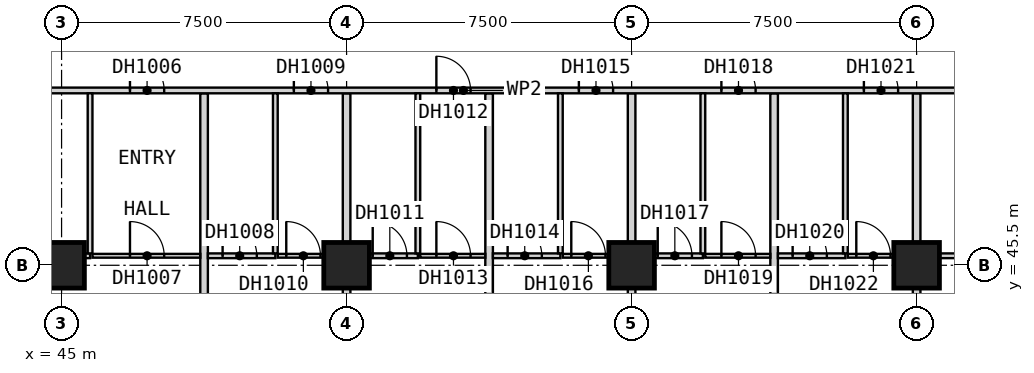
"""IFC4 building model, lengths in metres.
Left out: names, types, materials, properties, quantities, classifications, styles, units other than length and angle.
Written with IfcOpenShell. Run it as: python <this file> out.ifc"""

import sys

from ifc_helpers import new_model, si_unit, direction, frame, frame_2d, origin, origin_2d, place, context, subcontext, project, spatial, rectangle, extrude, element, fill, save


model = new_model("IFC4")
c1 = context("Model", 3, precision=1e-05, world=origin(), true_north=direction((0.0, 1.0)))
c2 = subcontext(c1, "Body", "Model", "MODEL_VIEW")
j1 = project(units=[si_unit("LENGTHUNIT", "METRE"), si_unit("PLANEANGLEUNIT", "RADIAN")], contexts=[c1])
p1 = place(None, origin())
s1 = spatial("IfcSite", under=j1, at=p1, CompositionType="ELEMENT")
p2 = place(p1, origin())
s2 = spatial("IfcBuilding", under=s1, at=p2, CompositionType="ELEMENT")
p3 = place(p2, frame((0.0, 0.0, 34.0)))
s3 = spatial("IfcBuildingStorey", under=s2, at=p3, CompositionType="ELEMENT", Elevation=34.0)
for number, where, z_axis, x_axis in (
    (1, (45.0, 45.5, 0.0), (0.0, 0.0, 1.0), (1.0, 0.0, 0.0)),
    (2, (52.5, 45.5, 0.0), (0.0, 0.0, 1.0), (1.0, 0.0, 0.0)),
    (3, (60.0, 45.5, 0.0), (0.0, 0.0, 1.0), (1.0, 0.0, 0.0)),
    (4, (67.5, 45.5, 0.0), (0.0, 0.0, 1.0), (1.0, 0.0, 0.0)),
):
    element("IfcColumn", number, at=place(p3, frame(where, z_axis=z_axis, x_axis=x_axis)), inside=s3, PredefinedType="COLUMN", context=c2, shape_type="SweptSolid", body=[
        extrude(rectangle(XDim=1.2, YDim=1.2, at=origin_2d()), origin(), (0.0, 0.0, 1.0), 3.6),
    ])
p4 = place(p3, frame((48.75, 38.31, 0.0), z_axis=(0.0, 0.0, 1.0), x_axis=(0.0, 1.0, 0.0)))
e5 = element("IfcWall", 5, at=p4, inside=s3, PredefinedType="PARTITIONING", context=c2, shape_type="SweptSolid", body=[
    extrude(rectangle(XDim=11.715, YDim=0.2, at=frame_2d((5.857, 0.0))), origin(), (0.0, 0.0, 1.0), 3.35),
])
p5 = place(p3, frame((52.5, 37.5, 0.0), z_axis=(0.0, 0.0, 1.0), x_axis=(0.0, 1.0, 0.0)))
e6 = element("IfcWall", 6, at=p5, inside=s3, PredefinedType="PARTITIONING", context=c2, shape_type="SweptSolid", body=[
    extrude(rectangle(XDim=12.525, YDim=0.2, at=frame_2d((6.262, 0.0))), origin(), (0.0, 0.0, 1.0), 3.35),
])
p6 = place(p3, frame((56.25, 38.31, 0.0), z_axis=(0.0, 0.0, 1.0), x_axis=(0.0, 1.0, 0.0)))
e7 = element("IfcWall", 7, at=p6, inside=s3, PredefinedType="PARTITIONING", context=c2, shape_type="SweptSolid", body=[
    extrude(rectangle(XDim=11.715, YDim=0.2, at=frame_2d((5.857, 0.0))), origin(), (0.0, 0.0, 1.0), 3.35),
])
p7 = place(p3, frame((60.0, 37.5, 0.0), z_axis=(0.0, 0.0, 1.0), x_axis=(0.0, 1.0, 0.0)))
e8 = element("IfcWall", 8, at=p7, inside=s3, PredefinedType="PARTITIONING", context=c2, shape_type="SweptSolid", body=[
    extrude(rectangle(XDim=12.525, YDim=0.2, at=frame_2d((6.262, 0.0))), origin(), (0.0, 0.0, 1.0), 3.35),
])
p8 = place(p3, frame((63.75, 38.31, 0.0), z_axis=(0.0, 0.0, 1.0), x_axis=(0.0, 1.0, 0.0)))
e9 = element("IfcWall", 9, at=p8, inside=s3, PredefinedType="PARTITIONING", context=c2, shape_type="SweptSolid", body=[
    extrude(rectangle(XDim=11.715, YDim=0.2, at=frame_2d((5.857, 0.0))), origin(), (0.0, 0.0, 1.0), 3.35),
])
p9 = place(p3, frame((67.5, 37.5, 0.0), z_axis=(0.0, 0.0, 1.0), x_axis=(0.0, 1.0, 0.0)))
e10 = element("IfcWall", 10, at=p9, inside=s3, PredefinedType="PARTITIONING", context=c2, shape_type="SweptSolid", body=[
    extrude(rectangle(XDim=12.525, YDim=0.2, at=frame_2d((6.262, 0.0))), origin(), (0.0, 0.0, 1.0), 3.35),
])
p10 = place(p3, frame((33.75, 50.1, 0.0), z_axis=(0.0, 0.0, 1.0), x_axis=(1.0, 0.0, 0.0)))
e11 = element("IfcWall", 11, at=p10, inside=s3, PredefinedType="PARTITIONING", context=c2, shape_type="SweptSolid", body=[
    extrude(rectangle(XDim=43.65, YDim=0.15, at=frame_2d((21.825, 0.0))), origin(), (0.0, 0.0, 1.0), 3.35),
])
p11 = place(p10, frame((5.175, 0.0, 0.0)))
e12 = element("IfcOpeningElement", 12, at=p11, cuts=e11, PredefinedType="OPENING", context=c2, shape_type="SweptSolid", body=[
    extrude(rectangle(XDim=0.9, YDim=2.1, at=frame_2d((0.45, 1.05))), frame((0.0, 0.085, 0.0), z_axis=(0.0, -1.0, 0.0), x_axis=(1.0, 0.0, 0.0)), (0.0, 0.0, 1.0), 0.17),
])
p12 = place(p10, frame((13.05, 0.0, 0.0)))
e13 = element("IfcOpeningElement", 13, at=p12, cuts=e11, PredefinedType="OPENING", context=c2, shape_type="SweptSolid", body=[
    extrude(rectangle(XDim=0.9, YDim=2.1, at=frame_2d((0.45, 1.05))), frame((0.0, 0.085, 0.0), z_axis=(0.0, -1.0, 0.0), x_axis=(1.0, 0.0, 0.0)), (0.0, 0.0, 1.0), 0.17),
])
p13 = place(p10, frame((17.363, 0.0, 0.0)))
e14 = element("IfcOpeningElement", 14, at=p13, cuts=e11, PredefinedType="OPENING", context=c2, shape_type="SweptSolid", body=[
    extrude(rectangle(XDim=0.9, YDim=2.1, at=frame_2d((0.45, 1.05))), frame((0.0, 0.085, 0.0), z_axis=(0.0, -1.0, 0.0), x_axis=(1.0, 0.0, 0.0)), (0.0, 0.0, 1.0), 0.17),
])
p14 = place(p10, frame((21.113, 0.0, 0.0)))
e15 = element("IfcOpeningElement", 15, at=p14, cuts=e11, PredefinedType="OPENING", context=c2, shape_type="SweptSolid", body=[
    extrude(rectangle(XDim=0.9, YDim=2.1, at=frame_2d((0.45, 1.05))), frame((0.0, 0.085, 0.0), z_axis=(0.0, -1.0, 0.0), x_axis=(1.0, 0.0, 0.0)), (0.0, 0.0, 1.0), 0.17),
])
p15 = place(p10, frame((24.863, 0.0, 0.0)))
e16 = element("IfcOpeningElement", 16, at=p15, cuts=e11, PredefinedType="OPENING", context=c2, shape_type="SweptSolid", body=[
    extrude(rectangle(XDim=0.9, YDim=2.1, at=frame_2d((0.45, 1.05))), frame((0.0, 0.085, 0.0), z_axis=(0.0, -1.0, 0.0), x_axis=(1.0, 0.0, 0.0)), (0.0, 0.0, 1.0), 0.17),
])
p16 = place(p10, frame((28.613, 0.0, 0.0)))
e17 = element("IfcOpeningElement", 17, at=p16, cuts=e11, PredefinedType="OPENING", context=c2, shape_type="SweptSolid", body=[
    extrude(rectangle(XDim=0.9, YDim=2.1, at=frame_2d((0.45, 1.05))), frame((0.0, 0.085, 0.0), z_axis=(0.0, -1.0, 0.0), x_axis=(1.0, 0.0, 0.0)), (0.0, 0.0, 1.0), 0.17),
])
p17 = place(p10, frame((32.363, 0.0, 0.0)))
e18 = element("IfcOpeningElement", 18, at=p17, cuts=e11, PredefinedType="OPENING", context=c2, shape_type="SweptSolid", body=[
    extrude(rectangle(XDim=0.9, YDim=2.1, at=frame_2d((0.45, 1.05))), frame((0.0, 0.085, 0.0), z_axis=(0.0, -1.0, 0.0), x_axis=(1.0, 0.0, 0.0)), (0.0, 0.0, 1.0), 0.17),
])
p18 = place(p10, frame((39.3, 0.0, 0.0)))
e19 = element("IfcOpeningElement", 19, at=p18, cuts=e11, PredefinedType="OPENING", context=c2, shape_type="SweptSolid", body=[
    extrude(rectangle(XDim=0.9, YDim=2.1, at=frame_2d((0.45, 1.05))), frame((0.0, 0.085, 0.0), z_axis=(0.0, -1.0, 0.0), x_axis=(1.0, 0.0, 0.0)), (0.0, 0.0, 1.0), 0.17),
])
p19 = place(p10, frame((42.0, 0.0, 0.0)))
e20 = element("IfcOpeningElement", 20, at=p19, cuts=e11, PredefinedType="OPENING", context=c2, shape_type="SweptSolid", body=[
    extrude(rectangle(XDim=0.9, YDim=2.1, at=frame_2d((0.45, 1.05))), frame((0.0, 0.085, 0.0), z_axis=(0.0, -1.0, 0.0), x_axis=(1.0, 0.0, 0.0)), (0.0, 0.0, 1.0), 0.17),
])
p20 = place(p3, frame((45.812, 45.75, 0.0), z_axis=(0.0, 0.0, 1.0), x_axis=(1.0, 0.0, 0.0)))
e21 = element("IfcWall", 21, at=p20, inside=s3, PredefinedType="PARTITIONING", context=c2, shape_type="SweptSolid", body=[
    extrude(rectangle(XDim=2.837, YDim=0.1, at=frame_2d((1.419, 0.0))), origin(), (0.0, 0.0, 1.0), 3.35),
])
p21 = place(p20, frame((0.988, 0.0, 0.0)))
e22 = element("IfcOpeningElement", 22, at=p21, cuts=e21, PredefinedType="OPENING", context=c2, shape_type="SweptSolid", body=[
    extrude(rectangle(XDim=0.9, YDim=2.1, at=frame_2d((0.45, 1.05))), frame((0.0, 0.06, 0.0), z_axis=(0.0, -1.0, 0.0), x_axis=(1.0, 0.0, 0.0)), (0.0, 0.0, 1.0), 0.12),
])
p22 = place(p3, frame((50.688, 45.75, 0.0), z_axis=(0.0, 0.0, 1.0), x_axis=(1.0, 0.0, 0.0)))
e23 = element("IfcWall", 23, at=p22, inside=s3, PredefinedType="PARTITIONING", context=c2, shape_type="SweptSolid", body=[
    extrude(rectangle(XDim=1.712, YDim=0.1, at=frame_2d((0.856, 0.0))), origin(), (0.0, 0.0, 1.0), 3.35),
])
p23 = place(p22, frame((0.225, 0.0, 0.0)))
e24 = element("IfcOpeningElement", 24, at=p23, cuts=e23, PredefinedType="OPENING", context=c2, shape_type="SweptSolid", body=[
    extrude(rectangle(XDim=0.9, YDim=2.1, at=frame_2d((0.45, 1.05))), frame((0.0, 0.06, 0.0), z_axis=(0.0, -1.0, 0.0), x_axis=(1.0, 0.0, 0.0)), (0.0, 0.0, 1.0), 0.12),
])
p24 = place(p3, frame((54.438, 45.75, 0.0), z_axis=(0.0, 0.0, 1.0), x_axis=(1.0, 0.0, 0.0)))
e25 = element("IfcWall", 25, at=p24, inside=s3, PredefinedType="PARTITIONING", context=c2, shape_type="SweptSolid", body=[
    extrude(rectangle(XDim=1.712, YDim=0.1, at=frame_2d((0.856, 0.0))), origin(), (0.0, 0.0, 1.0), 3.35),
])
p25 = place(p24, frame((0.425, 0.0, 0.0)))
e26 = element("IfcOpeningElement", 26, at=p25, cuts=e25, PredefinedType="OPENING", context=c2, shape_type="SweptSolid", body=[
    extrude(rectangle(XDim=0.9, YDim=2.1, at=frame_2d((0.45, 1.05))), frame((0.0, 0.06, 0.0), z_axis=(0.0, -1.0, 0.0), x_axis=(1.0, 0.0, 0.0)), (0.0, 0.0, 1.0), 0.12),
])
p26 = place(p3, frame((58.188, 45.75, 0.0), z_axis=(0.0, 0.0, 1.0), x_axis=(1.0, 0.0, 0.0)))
e27 = element("IfcWall", 27, at=p26, inside=s3, PredefinedType="PARTITIONING", context=c2, shape_type="SweptSolid", body=[
    extrude(rectangle(XDim=1.712, YDim=0.1, at=frame_2d((0.856, 0.0))), origin(), (0.0, 0.0, 1.0), 3.35),
])
p27 = place(p26, frame((0.225, 0.0, 0.0)))
e28 = element("IfcOpeningElement", 28, at=p27, cuts=e27, PredefinedType="OPENING", context=c2, shape_type="SweptSolid", body=[
    extrude(rectangle(XDim=0.9, YDim=2.1, at=frame_2d((0.45, 1.05))), frame((0.0, 0.06, 0.0), z_axis=(0.0, -1.0, 0.0), x_axis=(1.0, 0.0, 0.0)), (0.0, 0.0, 1.0), 0.12),
])
p28 = place(p3, frame((61.938, 45.75, 0.0), z_axis=(0.0, 0.0, 1.0), x_axis=(1.0, 0.0, 0.0)))
e29 = element("IfcWall", 29, at=p28, inside=s3, PredefinedType="PARTITIONING", context=c2, shape_type="SweptSolid", body=[
    extrude(rectangle(XDim=1.712, YDim=0.1, at=frame_2d((0.856, 0.0))), origin(), (0.0, 0.0, 1.0), 3.35),
])
p29 = place(p28, frame((0.425, 0.0, 0.0)))
e30 = element("IfcOpeningElement", 30, at=p29, cuts=e29, PredefinedType="OPENING", context=c2, shape_type="SweptSolid", body=[
    extrude(rectangle(XDim=0.9, YDim=2.1, at=frame_2d((0.45, 1.05))), frame((0.0, 0.06, 0.0), z_axis=(0.0, -1.0, 0.0), x_axis=(1.0, 0.0, 0.0)), (0.0, 0.0, 1.0), 0.12),
])
p30 = place(p3, frame((65.688, 45.75, 0.0), z_axis=(0.0, 0.0, 1.0), x_axis=(1.0, 0.0, 0.0)))
e31 = element("IfcWall", 31, at=p30, inside=s3, PredefinedType="PARTITIONING", context=c2, shape_type="SweptSolid", body=[
    extrude(rectangle(XDim=1.712, YDim=0.1, at=frame_2d((0.856, 0.0))), origin(), (0.0, 0.0, 1.0), 3.35),
])
p31 = place(p30, frame((0.225, 0.0, 0.0)))
e32 = element("IfcOpeningElement", 32, at=p31, cuts=e31, PredefinedType="OPENING", context=c2, shape_type="SweptSolid", body=[
    extrude(rectangle(XDim=0.9, YDim=2.1, at=frame_2d((0.45, 1.05))), frame((0.0, 0.06, 0.0), z_axis=(0.0, -1.0, 0.0), x_axis=(1.0, 0.0, 0.0)), (0.0, 0.0, 1.0), 0.12),
])
p32 = place(p3, frame((41.35, 45.75, 0.0), z_axis=(0.0, 0.0, 1.0), x_axis=(1.0, 0.0, 0.0)))
e33 = element("IfcWall", 33, at=p32, inside=s3, PredefinedType="PARTITIONING", context=c2, shape_type="SweptSolid", body=[
    extrude(rectangle(XDim=4.4, YDim=0.125, at=frame_2d((2.2, 0.0))), origin(), (0.0, 0.0, 1.0), 3.35),
])
p33 = place(p32, frame((1.7, 0.0, 0.0)))
e34 = element("IfcOpeningElement", 34, at=p33, cuts=e33, PredefinedType="OPENING", context=c2, shape_type="SweptSolid", body=[
    extrude(rectangle(XDim=0.9, YDim=2.1, at=frame_2d((0.45, 1.05))), frame((0.0, 0.073, 0.0), z_axis=(0.0, -1.0, 0.0), x_axis=(1.0, 0.0, 0.0)), (0.0, 0.0, 1.0), 0.145),
])
p34 = place(p3, frame((48.85, 45.75, 0.0), z_axis=(0.0, 0.0, 1.0), x_axis=(1.0, 0.0, 0.0)))
e35 = element("IfcWall", 35, at=p34, inside=s3, PredefinedType="PARTITIONING", context=c2, shape_type="SweptSolid", body=[
    extrude(rectangle(XDim=1.775, YDim=0.125, at=frame_2d((0.887, 0.0))), origin(), (0.0, 0.0, 1.0), 3.35),
])
p35 = place(p34, frame((0.387, 0.0, 0.0)))
e36 = element("IfcOpeningElement", 36, at=p35, cuts=e35, PredefinedType="OPENING", context=c2, shape_type="SweptSolid", body=[
    extrude(rectangle(XDim=0.9, YDim=2.1, at=frame_2d((0.45, 1.05))), frame((0.0, 0.073, 0.0), z_axis=(0.0, -1.0, 0.0), x_axis=(1.0, 0.0, 0.0)), (0.0, 0.0, 1.0), 0.145),
])
p36 = place(p3, frame((52.6, 45.75, 0.0), z_axis=(0.0, 0.0, 1.0), x_axis=(1.0, 0.0, 0.0)))
e37 = element("IfcWall", 37, at=p36, inside=s3, PredefinedType="PARTITIONING", context=c2, shape_type="SweptSolid", body=[
    extrude(rectangle(XDim=1.775, YDim=0.125, at=frame_2d((0.887, 0.0))), origin(), (0.0, 0.0, 1.0), 3.35),
])
p37 = place(p36, frame((0.587, 0.0, 0.0)))
e38 = element("IfcOpeningElement", 38, at=p37, cuts=e37, PredefinedType="OPENING", context=c2, shape_type="SweptSolid", body=[
    extrude(rectangle(XDim=0.9, YDim=2.1, at=frame_2d((0.45, 1.05))), frame((0.0, 0.073, 0.0), z_axis=(0.0, -1.0, 0.0), x_axis=(1.0, 0.0, 0.0)), (0.0, 0.0, 1.0), 0.145),
])
p38 = place(p3, frame((56.35, 45.75, 0.0), z_axis=(0.0, 0.0, 1.0), x_axis=(1.0, 0.0, 0.0)))
e39 = element("IfcWall", 39, at=p38, inside=s3, PredefinedType="PARTITIONING", context=c2, shape_type="SweptSolid", body=[
    extrude(rectangle(XDim=1.775, YDim=0.125, at=frame_2d((0.887, 0.0))), origin(), (0.0, 0.0, 1.0), 3.35),
])
p39 = place(p38, frame((0.387, 0.0, 0.0)))
e40 = element("IfcOpeningElement", 40, at=p39, cuts=e39, PredefinedType="OPENING", context=c2, shape_type="SweptSolid", body=[
    extrude(rectangle(XDim=0.9, YDim=2.1, at=frame_2d((0.45, 1.05))), frame((0.0, 0.073, 0.0), z_axis=(0.0, -1.0, 0.0), x_axis=(1.0, 0.0, 0.0)), (0.0, 0.0, 1.0), 0.145),
])
p40 = place(p3, frame((60.1, 45.75, 0.0), z_axis=(0.0, 0.0, 1.0), x_axis=(1.0, 0.0, 0.0)))
e41 = element("IfcWall", 41, at=p40, inside=s3, PredefinedType="PARTITIONING", context=c2, shape_type="SweptSolid", body=[
    extrude(rectangle(XDim=1.775, YDim=0.125, at=frame_2d((0.887, 0.0))), origin(), (0.0, 0.0, 1.0), 3.35),
])
p41 = place(p40, frame((0.587, 0.0, 0.0)))
e42 = element("IfcOpeningElement", 42, at=p41, cuts=e41, PredefinedType="OPENING", context=c2, shape_type="SweptSolid", body=[
    extrude(rectangle(XDim=0.9, YDim=2.1, at=frame_2d((0.45, 1.05))), frame((0.0, 0.073, 0.0), z_axis=(0.0, -1.0, 0.0), x_axis=(1.0, 0.0, 0.0)), (0.0, 0.0, 1.0), 0.145),
])
p42 = place(p3, frame((63.85, 45.75, 0.0), z_axis=(0.0, 0.0, 1.0), x_axis=(1.0, 0.0, 0.0)))
e43 = element("IfcWall", 43, at=p42, inside=s3, PredefinedType="PARTITIONING", context=c2, shape_type="SweptSolid", body=[
    extrude(rectangle(XDim=1.775, YDim=0.125, at=frame_2d((0.887, 0.0))), origin(), (0.0, 0.0, 1.0), 3.35),
])
p43 = place(p42, frame((0.387, 0.0, 0.0)))
e44 = element("IfcOpeningElement", 44, at=p43, cuts=e43, PredefinedType="OPENING", context=c2, shape_type="SweptSolid", body=[
    extrude(rectangle(XDim=0.9, YDim=2.1, at=frame_2d((0.45, 1.05))), frame((0.0, 0.073, 0.0), z_axis=(0.0, -1.0, 0.0), x_axis=(1.0, 0.0, 0.0)), (0.0, 0.0, 1.0), 0.145),
])
p44 = place(p3, frame((67.6, 45.75, 0.0), z_axis=(0.0, 0.0, 1.0), x_axis=(1.0, 0.0, 0.0)))
e45 = element("IfcWall", 45, at=p44, inside=s3, PredefinedType="PARTITIONING", context=c2, shape_type="SweptSolid", body=[
    extrude(rectangle(XDim=4.4, YDim=0.125, at=frame_2d((2.2, 0.0))), origin(), (0.0, 0.0, 1.0), 3.35),
])
p45 = place(p44, frame((1.7, 0.0, 0.0)))
e46 = element("IfcOpeningElement", 46, at=p45, cuts=e45, PredefinedType="OPENING", context=c2, shape_type="SweptSolid", body=[
    extrude(rectangle(XDim=0.9, YDim=2.1, at=frame_2d((0.45, 1.05))), frame((0.0, 0.073, 0.0), z_axis=(0.0, -1.0, 0.0), x_axis=(1.0, 0.0, 0.0)), (0.0, 0.0, 1.0), 0.145),
])
for number, where, z_axis, x_axis in (
    (47, (45.75, 45.812, 0.0), (0.0, 0.0, 1.0), (0.0, 1.0, 0.0)),
    (48, (50.625, 45.812, 0.0), (0.0, 0.0, 1.0), (0.0, 1.0, 0.0)),
    (49, (54.375, 45.812, 0.0), (0.0, 0.0, 1.0), (0.0, 1.0, 0.0)),
    (50, (58.125, 45.812, 0.0), (0.0, 0.0, 1.0), (0.0, 1.0, 0.0)),
    (51, (61.875, 45.812, 0.0), (0.0, 0.0, 1.0), (0.0, 1.0, 0.0)),
    (52, (65.625, 45.812, 0.0), (0.0, 0.0, 1.0), (0.0, 1.0, 0.0)),
):
    element("IfcWall", number, at=place(p3, frame(where, z_axis=z_axis, x_axis=x_axis)), inside=s3, PredefinedType="PARTITIONING", context=c2, shape_type="SweptSolid", body=[
        extrude(rectangle(XDim=4.212, YDim=0.125, at=frame_2d((2.106, 0.0))), origin(), (0.0, 0.0, 1.0), 3.35),
    ])
p46 = place(p12, origin())
e53 = element("IfcDoor", 53, at=p46, inside=s3, OperationType="SINGLE_SWING_RIGHT", PredefinedType="DOOR", context=c2, shape_type="SweptSolid", body=[
    extrude(rectangle(XDim=0.9, YDim=2.1, at=frame_2d((0.45, 1.05))), frame((0.0, 0.025, 0.0), z_axis=(0.0, -1.0, 0.0), x_axis=(1.0, 0.0, 0.0)), (0.0, 0.0, 1.0), 0.05),
])
fill(e13, e53)
p47 = place(p21, origin())
e54 = element("IfcDoor", 54, at=p47, inside=s3, OperationType="SINGLE_SWING_LEFT", PredefinedType="DOOR", context=c2, shape_type="SweptSolid", body=[
    extrude(rectangle(XDim=0.9, YDim=2.1, at=frame_2d((0.45, 1.05))), frame((0.0, 0.025, 0.0), z_axis=(0.0, -1.0, 0.0), x_axis=(1.0, 0.0, 0.0)), (0.0, 0.0, 1.0), 0.05),
])
fill(e22, e54)
p48 = place(p35, origin())
e55 = element("IfcDoor", 55, at=p48, inside=s3, OperationType="SINGLE_SWING_LEFT", PredefinedType="DOOR", context=c2, shape_type="SweptSolid", body=[
    extrude(rectangle(XDim=0.9, YDim=2.1, at=frame_2d((0.45, 1.05))), frame((0.0, 0.025, 0.0), z_axis=(0.0, -1.0, 0.0), x_axis=(1.0, 0.0, 0.0)), (0.0, 0.0, 1.0), 0.05),
])
fill(e36, e55)
p49 = place(p13, origin())
e56 = element("IfcDoor", 56, at=p49, inside=s3, OperationType="SINGLE_SWING_RIGHT", PredefinedType="DOOR", context=c2, shape_type="SweptSolid", body=[
    extrude(rectangle(XDim=0.9, YDim=2.1, at=frame_2d((0.45, 1.05))), frame((0.0, 0.025, 0.0), z_axis=(0.0, -1.0, 0.0), x_axis=(1.0, 0.0, 0.0)), (0.0, 0.0, 1.0), 0.05),
])
fill(e14, e56)
p50 = place(p23, origin())
e57 = element("IfcDoor", 57, at=p50, inside=s3, OperationType="SINGLE_SWING_LEFT", PredefinedType="DOOR", context=c2, shape_type="SweptSolid", body=[
    extrude(rectangle(XDim=0.9, YDim=2.1, at=frame_2d((0.45, 1.05))), frame((0.0, 0.025, 0.0), z_axis=(0.0, -1.0, 0.0), x_axis=(1.0, 0.0, 0.0)), (0.0, 0.0, 1.0), 0.05),
])
fill(e24, e57)
p51 = place(p37, origin())
e58 = element("IfcDoor", 58, at=p51, inside=s3, OperationType="SINGLE_SWING_RIGHT", PredefinedType="DOOR", context=c2, shape_type="SweptSolid", body=[
    extrude(rectangle(XDim=0.9, YDim=2.1, at=frame_2d((0.45, 1.05))), frame((0.0, 0.025, 0.0), z_axis=(0.0, -1.0, 0.0), x_axis=(1.0, 0.0, 0.0)), (0.0, 0.0, 1.0), 0.05),
])
fill(e38, e58)
p52 = place(p14, origin())
e59 = element("IfcDoor", 59, at=p52, inside=s3, OperationType="SINGLE_SWING_RIGHT", PredefinedType="DOOR", context=c2, shape_type="SweptSolid", body=[
    extrude(rectangle(XDim=0.9, YDim=2.1, at=frame_2d((0.45, 1.05))), frame((0.0, 0.025, 0.0), z_axis=(0.0, -1.0, 0.0), x_axis=(1.0, 0.0, 0.0)), (0.0, 0.0, 1.0), 0.05),
])
fill(e15, e59)
p53 = place(p25, origin())
e60 = element("IfcDoor", 60, at=p53, inside=s3, OperationType="SINGLE_SWING_LEFT", PredefinedType="DOOR", context=c2, shape_type="SweptSolid", body=[
    extrude(rectangle(XDim=0.9, YDim=2.1, at=frame_2d((0.45, 1.05))), frame((0.0, 0.025, 0.0), z_axis=(0.0, -1.0, 0.0), x_axis=(1.0, 0.0, 0.0)), (0.0, 0.0, 1.0), 0.05),
])
fill(e26, e60)
p54 = place(p39, origin())
e61 = element("IfcDoor", 61, at=p54, inside=s3, OperationType="SINGLE_SWING_LEFT", PredefinedType="DOOR", context=c2, shape_type="SweptSolid", body=[
    extrude(rectangle(XDim=0.9, YDim=2.1, at=frame_2d((0.45, 1.05))), frame((0.0, 0.025, 0.0), z_axis=(0.0, -1.0, 0.0), x_axis=(1.0, 0.0, 0.0)), (0.0, 0.0, 1.0), 0.05),
])
fill(e40, e61)
p55 = place(p15, origin())
e62 = element("IfcDoor", 62, at=p55, inside=s3, OperationType="SINGLE_SWING_RIGHT", PredefinedType="DOOR", context=c2, shape_type="SweptSolid", body=[
    extrude(rectangle(XDim=0.9, YDim=2.1, at=frame_2d((0.45, 1.05))), frame((0.0, 0.025, 0.0), z_axis=(0.0, -1.0, 0.0), x_axis=(1.0, 0.0, 0.0)), (0.0, 0.0, 1.0), 0.05),
])
fill(e16, e62)
p56 = place(p27, origin())
e63 = element("IfcDoor", 63, at=p56, inside=s3, OperationType="SINGLE_SWING_LEFT", PredefinedType="DOOR", context=c2, shape_type="SweptSolid", body=[
    extrude(rectangle(XDim=0.9, YDim=2.1, at=frame_2d((0.45, 1.05))), frame((0.0, 0.025, 0.0), z_axis=(0.0, -1.0, 0.0), x_axis=(1.0, 0.0, 0.0)), (0.0, 0.0, 1.0), 0.05),
])
fill(e28, e63)
p57 = place(p41, origin())
e64 = element("IfcDoor", 64, at=p57, inside=s3, OperationType="SINGLE_SWING_RIGHT", PredefinedType="DOOR", context=c2, shape_type="SweptSolid", body=[
    extrude(rectangle(XDim=0.9, YDim=2.1, at=frame_2d((0.45, 1.05))), frame((0.0, 0.025, 0.0), z_axis=(0.0, -1.0, 0.0), x_axis=(1.0, 0.0, 0.0)), (0.0, 0.0, 1.0), 0.05),
])
fill(e42, e64)
p58 = place(p16, origin())
e65 = element("IfcDoor", 65, at=p58, inside=s3, OperationType="SINGLE_SWING_RIGHT", PredefinedType="DOOR", context=c2, shape_type="SweptSolid", body=[
    extrude(rectangle(XDim=0.9, YDim=2.1, at=frame_2d((0.45, 1.05))), frame((0.0, 0.025, 0.0), z_axis=(0.0, -1.0, 0.0), x_axis=(1.0, 0.0, 0.0)), (0.0, 0.0, 1.0), 0.05),
])
fill(e17, e65)
p59 = place(p29, origin())
e66 = element("IfcDoor", 66, at=p59, inside=s3, OperationType="SINGLE_SWING_LEFT", PredefinedType="DOOR", context=c2, shape_type="SweptSolid", body=[
    extrude(rectangle(XDim=0.9, YDim=2.1, at=frame_2d((0.45, 1.05))), frame((0.0, 0.025, 0.0), z_axis=(0.0, -1.0, 0.0), x_axis=(1.0, 0.0, 0.0)), (0.0, 0.0, 1.0), 0.05),
])
fill(e30, e66)
p60 = place(p43, origin())
e67 = element("IfcDoor", 67, at=p60, inside=s3, OperationType="SINGLE_SWING_LEFT", PredefinedType="DOOR", context=c2, shape_type="SweptSolid", body=[
    extrude(rectangle(XDim=0.9, YDim=2.1, at=frame_2d((0.45, 1.05))), frame((0.0, 0.025, 0.0), z_axis=(0.0, -1.0, 0.0), x_axis=(1.0, 0.0, 0.0)), (0.0, 0.0, 1.0), 0.05),
])
fill(e44, e67)
p61 = place(p17, origin())
e68 = element("IfcDoor", 68, at=p61, inside=s3, OperationType="SINGLE_SWING_RIGHT", PredefinedType="DOOR", context=c2, shape_type="SweptSolid", body=[
    extrude(rectangle(XDim=0.9, YDim=2.1, at=frame_2d((0.45, 1.05))), frame((0.0, 0.025, 0.0), z_axis=(0.0, -1.0, 0.0), x_axis=(1.0, 0.0, 0.0)), (0.0, 0.0, 1.0), 0.05),
])
fill(e18, e68)
p62 = place(p31, origin())
e69 = element("IfcDoor", 69, at=p62, inside=s3, OperationType="SINGLE_SWING_LEFT", PredefinedType="DOOR", context=c2, shape_type="SweptSolid", body=[
    extrude(rectangle(XDim=0.9, YDim=2.1, at=frame_2d((0.45, 1.05))), frame((0.0, 0.025, 0.0), z_axis=(0.0, -1.0, 0.0), x_axis=(1.0, 0.0, 0.0)), (0.0, 0.0, 1.0), 0.05),
])
fill(e32, e69)
save(model, sys.argv[1])
